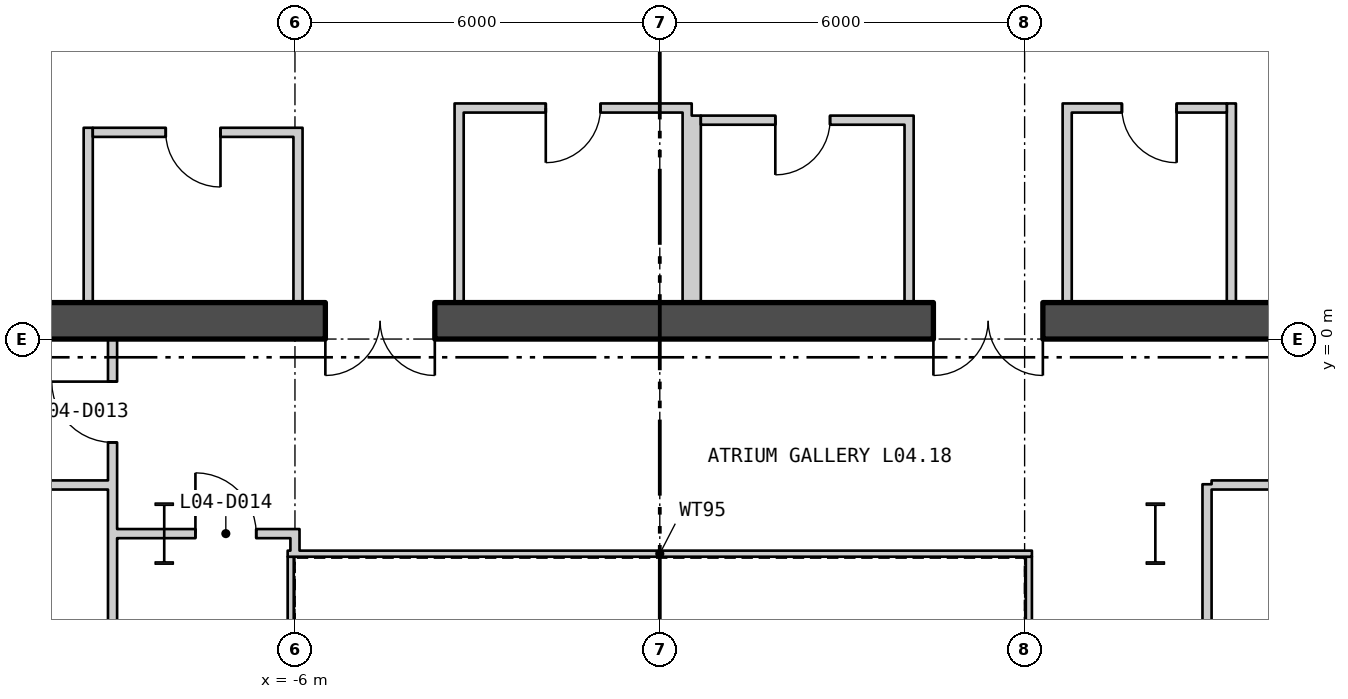
"""IFC4 building model, lengths in metres.
Left out: names, types, materials, properties, quantities, classifications, styles, units other than length and angle.
Written with IfcOpenShell. Run it as: python <this file> out.ifc"""

import sys

from ifc_helpers import new_model, si_unit, direction, frame, frame_2d, origin, origin_2d, place, context, subcontext, project, spatial, rectangle, i_section, extrude, element, fill, save


model = new_model("IFC4")
c1 = context("Model", 3, precision=1e-05, world=origin(), true_north=direction((0.0, 1.0)))
c2 = subcontext(c1, "Body", "Model", "MODEL_VIEW")
j1 = project(units=[si_unit("LENGTHUNIT", "METRE"), si_unit("PLANEANGLEUNIT", "RADIAN")], contexts=[c1])
p1 = place(None, origin())
s1 = spatial("IfcSite", under=j1, at=p1, CompositionType="ELEMENT")
p2 = place(p1, origin())
s2 = spatial("IfcBuilding", under=s1, at=p2, CompositionType="ELEMENT")
p3 = place(p2, frame((0.0, 0.0, 23.7)))
s3 = spatial("IfcBuildingStorey", under=s2, at=p3, CompositionType="ELEMENT", Elevation=23.7)
for number, where, z_axis, x_axis in (
    (1, (8.15, -3.2, 0.0), (0.0, 0.0, 1.0), (1.0, 0.0, 0.0)),
    (2, (-8.15, -3.2, 0.0), (0.0, 0.0, 1.0), (1.0, 0.0, 0.0)),
):
    element("IfcColumn", number, at=place(p3, frame(where, z_axis=z_axis, x_axis=x_axis)), inside=s3, PredefinedType="COLUMN", context=c2, shape_type="SweptSolid", body=[
        extrude(i_section(OverallWidth=0.302, OverallDepth=1.008, WebThickness=0.021, FlangeThickness=0.04, at=origin_2d()), origin(), (0.0, 0.0, 1.0), 5.1),
    ])
p4 = place(p3, frame((6.07, -11.62, 0.0), z_axis=(0.0, 0.0, 1.0), x_axis=(0.0, 1.0, 0.0)))
e3 = element("IfcWall", 3, at=p4, inside=s3, PredefinedType="PARTITIONING", context=c2, shape_type="SweptSolid", body=[
    extrude(rectangle(XDim=8.04, YDim=0.1, at=frame_2d((4.02, 0.0))), origin(), (0.0, 0.0, 1.0), 4.85),
])
p5 = place(p3, frame((6.12, -3.53, 0.0), z_axis=(0.0, 0.0, 1.0), x_axis=(-1.0, 0.0, 0.0)))
e4 = element("IfcWall", 4, at=p5, inside=s3, PredefinedType="PARTITIONING", context=c2, shape_type="SweptSolid", body=[
    extrude(rectangle(XDim=12.24, YDim=0.1, at=frame_2d((6.12, 0.0))), origin(), (0.0, 0.0, 1.0), 4.85),
])
p6 = place(p3, frame((-6.07, -3.58, 0.0), z_axis=(0.0, 0.0, 1.0), x_axis=(0.0, -1.0, 0.0)))
e5 = element("IfcWall", 5, at=p6, inside=s3, PredefinedType="PARTITIONING", context=c2, shape_type="SweptSolid", body=[
    extrude(rectangle(XDim=8.04, YDim=0.1, at=frame_2d((4.02, 0.0))), origin(), (0.0, 0.0, 1.0), 4.85),
])
p7 = place(p3, frame((-17.5, 0.3, 0.0), z_axis=(0.0, 0.0, 1.0), x_axis=(1.0, 0.0, 0.0)))
e6 = element("IfcWall", 6, at=p7, inside=s3, PredefinedType="SHEAR", context=c2, shape_type="SweptSolid", body=[
    extrude(rectangle(XDim=35.0, YDim=0.6, at=frame_2d((17.5, 0.0))), origin(), (0.0, 0.0, 1.0), 4.85),
])
p8 = place(p7, frame((12.0, 0.0, 0.0)))
e7 = element("IfcOpeningElement", 7, at=p8, cuts=e6, PredefinedType="OPENING", context=c2, shape_type="SweptSolid", body=[
    extrude(rectangle(XDim=1.8, YDim=2.4, at=frame_2d((0.9, 1.2))), frame((0.0, 0.31, 0.0), z_axis=(0.0, -1.0, 0.0), x_axis=(1.0, 0.0, 0.0)), (0.0, 0.0, 1.0), 0.62),
])
p9 = place(p7, frame((22.0, 0.0, 0.0)))
e8 = element("IfcOpeningElement", 8, at=p9, cuts=e6, PredefinedType="OPENING", context=c2, shape_type="SweptSolid", body=[
    extrude(rectangle(XDim=1.8, YDim=2.4, at=frame_2d((0.9, 1.2))), frame((0.0, 0.31, 0.0), z_axis=(0.0, -1.0, 0.0), x_axis=(1.0, 0.0, 0.0)), (0.0, 0.0, 1.0), 0.62),
])
for number, where, z_axis, x_axis in (
    (9, (-9.4, 0.6, 0.0), (0.0, 0.0, 1.0), (0.0, 1.0, 0.0)),
    (10, (-5.95, 0.6, 0.0), (0.0, 0.0, 1.0), (0.0, 1.0, 0.0)),
):
    element("IfcWall", number, at=place(p3, frame(where, z_axis=z_axis, x_axis=x_axis)), inside=s3, PredefinedType="PARTITIONING", context=c2, shape_type="SweptSolid", body=[
        extrude(rectangle(XDim=2.875, YDim=0.15, at=frame_2d((1.438, 0.0))), origin(), (0.0, 0.0, 1.0), 4.85),
    ])
p10 = place(p3, frame((-9.325, 3.4, 0.0), z_axis=(0.0, 0.0, 1.0), x_axis=(1.0, 0.0, 0.0)))
e11 = element("IfcWall", 11, at=p10, inside=s3, PredefinedType="PARTITIONING", context=c2, shape_type="SweptSolid", body=[
    extrude(rectangle(XDim=3.3, YDim=0.15, at=frame_2d((1.65, 0.0))), origin(), (0.0, 0.0, 1.0), 4.85),
])
p11 = place(p10, frame((1.2, 0.0, 0.0)))
e12 = element("IfcOpeningElement", 12, at=p11, cuts=e11, PredefinedType="OPENING", context=c2, shape_type="SweptSolid", body=[
    extrude(rectangle(XDim=0.9, YDim=2.1, at=frame_2d((0.45, 1.05))), frame((0.0, 0.085, 0.0), z_axis=(0.0, -1.0, 0.0), x_axis=(1.0, 0.0, 0.0)), (0.0, 0.0, 1.0), 0.17),
])
for number, where, z_axis, x_axis in (
    (13, (-3.3, 0.6, 0.0), (0.0, 0.0, 1.0), (0.0, 1.0, 0.0)),
    (14, (0.45, 0.6, 0.0), (0.0, 0.0, 1.0), (0.0, 1.0, 0.0)),
):
    element("IfcWall", number, at=place(p3, frame(where, z_axis=z_axis, x_axis=x_axis)), inside=s3, PredefinedType="PARTITIONING", context=c2, shape_type="SweptSolid", body=[
        extrude(rectangle(XDim=3.275, YDim=0.15, at=frame_2d((1.637, 0.0))), origin(), (0.0, 0.0, 1.0), 4.85),
    ])
p12 = place(p3, frame((-3.225, 3.8, 0.0), z_axis=(0.0, 0.0, 1.0), x_axis=(1.0, 0.0, 0.0)))
e15 = element("IfcWall", 15, at=p12, inside=s3, PredefinedType="PARTITIONING", context=c2, shape_type="SweptSolid", body=[
    extrude(rectangle(XDim=3.6, YDim=0.15, at=frame_2d((1.8, 0.0))), origin(), (0.0, 0.0, 1.0), 4.85),
])
p13 = place(p12, frame((1.35, 0.0, 0.0)))
e16 = element("IfcOpeningElement", 16, at=p13, cuts=e15, PredefinedType="OPENING", context=c2, shape_type="SweptSolid", body=[
    extrude(rectangle(XDim=0.9, YDim=2.1, at=frame_2d((0.45, 1.05))), frame((0.0, 0.085, 0.0), z_axis=(0.0, -1.0, 0.0), x_axis=(1.0, 0.0, 0.0)), (0.0, 0.0, 1.0), 0.17),
])
for number, where, z_axis, x_axis in (
    (17, (0.6, 0.6, 0.0), (0.0, 0.0, 1.0), (0.0, 1.0, 0.0)),
    (18, (4.1, 0.6, 0.0), (0.0, 0.0, 1.0), (0.0, 1.0, 0.0)),
):
    element("IfcWall", number, at=place(p3, frame(where, z_axis=z_axis, x_axis=x_axis)), inside=s3, PredefinedType="PARTITIONING", context=c2, shape_type="SweptSolid", body=[
        extrude(rectangle(XDim=3.075, YDim=0.15, at=frame_2d((1.538, 0.0))), origin(), (0.0, 0.0, 1.0), 4.85),
    ])
p14 = place(p3, frame((0.675, 3.6, 0.0), z_axis=(0.0, 0.0, 1.0), x_axis=(1.0, 0.0, 0.0)))
e19 = element("IfcWall", 19, at=p14, inside=s3, PredefinedType="PARTITIONING", context=c2, shape_type="SweptSolid", body=[
    extrude(rectangle(XDim=3.35, YDim=0.15, at=frame_2d((1.675, 0.0))), origin(), (0.0, 0.0, 1.0), 4.85),
])
p15 = place(p14, frame((1.225, 0.0, 0.0)))
e20 = element("IfcOpeningElement", 20, at=p15, cuts=e19, PredefinedType="OPENING", context=c2, shape_type="SweptSolid", body=[
    extrude(rectangle(XDim=0.9, YDim=2.1, at=frame_2d((0.45, 1.05))), frame((0.0, 0.085, 0.0), z_axis=(0.0, -1.0, 0.0), x_axis=(1.0, 0.0, 0.0)), (0.0, 0.0, 1.0), 0.17),
])
for number, where, z_axis, x_axis in (
    (21, (6.7, 0.6, 0.0), (0.0, 0.0, 1.0), (0.0, 1.0, 0.0)),
    (22, (9.4, 0.6, 0.0), (0.0, 0.0, 1.0), (0.0, 1.0, 0.0)),
):
    element("IfcWall", number, at=place(p3, frame(where, z_axis=z_axis, x_axis=x_axis)), inside=s3, PredefinedType="PARTITIONING", context=c2, shape_type="SweptSolid", body=[
        extrude(rectangle(XDim=3.275, YDim=0.15, at=frame_2d((1.637, 0.0))), origin(), (0.0, 0.0, 1.0), 4.85),
    ])
p16 = place(p3, frame((6.775, 3.8, 0.0), z_axis=(0.0, 0.0, 1.0), x_axis=(1.0, 0.0, 0.0)))
e23 = element("IfcWall", 23, at=p16, inside=s3, PredefinedType="PARTITIONING", context=c2, shape_type="SweptSolid", body=[
    extrude(rectangle(XDim=2.55, YDim=0.15, at=frame_2d((1.275, 0.0))), origin(), (0.0, 0.0, 1.0), 4.85),
])
p17 = place(p16, frame((0.825, 0.0, 0.0)))
e24 = element("IfcOpeningElement", 24, at=p17, cuts=e23, PredefinedType="OPENING", context=c2, shape_type="SweptSolid", body=[
    extrude(rectangle(XDim=0.9, YDim=2.1, at=frame_2d((0.45, 1.05))), frame((0.0, 0.085, 0.0), z_axis=(0.0, -1.0, 0.0), x_axis=(1.0, 0.0, 0.0)), (0.0, 0.0, 1.0), 0.17),
])
p18 = place(p3, frame((-17.025, -2.4, 0.0), z_axis=(0.0, 0.0, 1.0), x_axis=(1.0, 0.0, 0.0)))
e25 = element("IfcWall", 25, at=p18, inside=s3, PredefinedType="PARTITIONING", context=c2, shape_type="SweptSolid", body=[
    extrude(rectangle(XDim=7.95, YDim=0.15, at=frame_2d((3.975, 0.0))), origin(), (0.0, 0.0, 1.0), 4.85),
])
p19 = place(p18, frame((5.294, 0.0, 0.0)))
e26 = element("IfcOpeningElement", 26, at=p19, cuts=e25, PredefinedType="OPENING", context=c2, shape_type="SweptSolid", body=[
    extrude(rectangle(XDim=1.0, YDim=2.1, at=frame_2d((0.5, 1.05))), frame((0.0, 0.085, 0.0), z_axis=(0.0, -1.0, 0.0), x_axis=(1.0, 0.0, 0.0)), (0.0, 0.0, 1.0), 0.17),
])
p20 = place(p3, frame((-9.0, -13.675, 0.0), z_axis=(0.0, 0.0, 1.0), x_axis=(0.0, 1.0, 0.0)))
e27 = element("IfcWall", 27, at=p20, inside=s3, PredefinedType="PARTITIONING", context=c2, shape_type="SweptSolid", body=[
    extrude(rectangle(XDim=13.675, YDim=0.15, at=frame_2d((6.838, 0.0))), origin(), (0.0, 0.0, 1.0), 4.85),
])
p21 = place(p20, frame((11.975, 0.0, 0.0)))
e28 = element("IfcOpeningElement", 28, at=p21, cuts=e27, PredefinedType="OPENING", context=c2, shape_type="SweptSolid", body=[
    extrude(rectangle(XDim=1.0, YDim=2.1, at=frame_2d((0.5, 1.05))), frame((0.0, 0.085, 0.0), z_axis=(0.0, -1.0, 0.0), x_axis=(1.0, 0.0, 0.0)), (0.0, 0.0, 1.0), 0.17),
])
p22 = place(p3, frame((-8.925, -3.2, 0.0), z_axis=(0.0, 0.0, 1.0), x_axis=(1.0, 0.0, 0.0)))
e29 = element("IfcWall", 29, at=p22, inside=s3, PredefinedType="PARTITIONING", context=c2, shape_type="SweptSolid", body=[
    extrude(rectangle(XDim=0.775, YDim=0.15, at=frame_2d((0.388, 0.0))), origin(), (0.0, 0.0, 1.0), 4.16),
])
p23 = place(p3, frame((-8.15, -3.2, 0.0), z_axis=(0.0, 0.0, 1.0), x_axis=(1.0, 0.0, 0.0)))
e30 = element("IfcWall", 30, at=p23, inside=s3, PredefinedType="PARTITIONING", context=c2, shape_type="SweptSolid", body=[
    extrude(rectangle(XDim=2.225, YDim=0.15, at=frame_2d((1.113, 0.0))), origin(), (0.0, 0.0, 1.0), 3.94),
])
p24 = place(p23, frame((0.513, 0.0, 0.0)))
e31 = element("IfcOpeningElement", 31, at=p24, cuts=e30, PredefinedType="OPENING", context=c2, shape_type="SweptSolid", body=[
    extrude(rectangle(XDim=1.0, YDim=2.1, at=frame_2d((0.5, 1.05))), frame((0.0, 0.085, 0.0), z_axis=(0.0, -1.0, 0.0), x_axis=(1.0, 0.0, 0.0)), (0.0, 0.0, 1.0), 0.17),
])
p25 = place(p3, frame((-6.0, -3.48, 0.0), z_axis=(0.0, 0.0, 1.0), x_axis=(0.0, 1.0, 0.0)))
e32 = element("IfcWall", 32, at=p25, inside=s3, PredefinedType="PARTITIONING", context=c2, shape_type="SweptSolid", body=[
    extrude(rectangle(XDim=0.205, YDim=0.15, at=frame_2d((0.102, 0.0))), origin(), (0.0, 0.0, 1.0), 4.85),
])
p26 = place(p3, frame((9.0, -13.675, 0.0), z_axis=(0.0, 0.0, 1.0), x_axis=(0.0, 1.0, 0.0)))
e33 = element("IfcWall", 33, at=p26, inside=s3, PredefinedType="PARTITIONING", context=c2, shape_type="SweptSolid", body=[
    extrude(rectangle(XDim=11.287, YDim=0.15, at=frame_2d((5.644, 0.0))), origin(), (0.0, 0.0, 1.0), 4.85),
])
p27 = place(p26, frame((2.498, 0.0, 0.0)))
e34 = element("IfcOpeningElement", 34, at=p27, cuts=e33, PredefinedType="OPENING", context=c2, shape_type="SweptSolid", body=[
    extrude(rectangle(XDim=1.8, YDim=2.1, at=frame_2d((0.9, 1.05))), frame((0.0, 0.085, 0.0), z_axis=(0.0, -1.0, 0.0), x_axis=(1.0, 0.0, 0.0)), (0.0, 0.0, 1.0), 0.17),
])
p28 = place(p3, frame((9.075, -2.4, 0.0), z_axis=(0.0, 0.0, 1.0), x_axis=(1.0, 0.0, 0.0)))
e35 = element("IfcWall", 35, at=p28, inside=s3, PredefinedType="PARTITIONING", context=c2, shape_type="SweptSolid", body=[
    extrude(rectangle(XDim=7.95, YDim=0.15, at=frame_2d((3.975, 0.0))), origin(), (0.0, 0.0, 1.0), 4.85),
])
p29 = place(p28, frame((1.329, 0.0, 0.0)))
e36 = element("IfcOpeningElement", 36, at=p29, cuts=e35, PredefinedType="OPENING", context=c2, shape_type="SweptSolid", body=[
    extrude(rectangle(XDim=1.0, YDim=2.1, at=frame_2d((0.5, 1.05))), frame((0.0, 0.085, 0.0), z_axis=(0.0, -1.0, 0.0), x_axis=(1.0, 0.0, 0.0)), (0.0, 0.0, 1.0), 0.17),
])
p30 = place(p28, frame((5.279, 0.0, 0.0)))
e37 = element("IfcOpeningElement", 37, at=p30, cuts=e35, PredefinedType="OPENING", context=c2, shape_type="SweptSolid", body=[
    extrude(rectangle(XDim=1.0, YDim=2.1, at=frame_2d((0.5, 1.05))), frame((0.0, 0.085, 0.0), z_axis=(0.0, -1.0, 0.0), x_axis=(1.0, 0.0, 0.0)), (0.0, 0.0, 1.0), 0.17),
])
p31 = place(p11, origin())
e38 = element("IfcDoor", 38, at=p31, inside=s3, OperationType="SINGLE_SWING_RIGHT", PredefinedType="DOOR", context=c2, shape_type="SweptSolid", body=[
    extrude(rectangle(XDim=0.9, YDim=2.1, at=frame_2d((0.45, 1.05))), frame((0.0, 0.025, 0.0), z_axis=(0.0, -1.0, 0.0), x_axis=(1.0, 0.0, 0.0)), (0.0, 0.0, 1.0), 0.05),
])
fill(e12, e38)
p32 = place(p13, origin())
e39 = element("IfcDoor", 39, at=p32, inside=s3, OperationType="SINGLE_SWING_LEFT", PredefinedType="DOOR", context=c2, shape_type="SweptSolid", body=[
    extrude(rectangle(XDim=0.9, YDim=2.1, at=frame_2d((0.45, 1.05))), frame((0.0, 0.025, 0.0), z_axis=(0.0, -1.0, 0.0), x_axis=(1.0, 0.0, 0.0)), (0.0, 0.0, 1.0), 0.05),
])
fill(e16, e39)
p33 = place(p15, origin())
e40 = element("IfcDoor", 40, at=p33, inside=s3, OperationType="SINGLE_SWING_LEFT", PredefinedType="DOOR", context=c2, shape_type="SweptSolid", body=[
    extrude(rectangle(XDim=0.9, YDim=2.1, at=frame_2d((0.45, 1.05))), frame((0.0, 0.025, 0.0), z_axis=(0.0, -1.0, 0.0), x_axis=(1.0, 0.0, 0.0)), (0.0, 0.0, 1.0), 0.05),
])
fill(e20, e40)
p34 = place(p17, origin())
e41 = element("IfcDoor", 41, at=p34, inside=s3, OperationType="SINGLE_SWING_RIGHT", PredefinedType="DOOR", context=c2, shape_type="SweptSolid", body=[
    extrude(rectangle(XDim=0.9, YDim=2.1, at=frame_2d((0.45, 1.05))), frame((0.0, 0.025, 0.0), z_axis=(0.0, -1.0, 0.0), x_axis=(1.0, 0.0, 0.0)), (0.0, 0.0, 1.0), 0.05),
])
fill(e24, e41)
p35 = place(p8, origin())
e42 = element("IfcDoor", 42, at=p35, inside=s3, OperationType="DOUBLE_DOOR_SINGLE_SWING", PredefinedType="DOOR", context=c2, shape_type="SweptSolid", body=[
    extrude(rectangle(XDim=1.8, YDim=2.4, at=frame_2d((0.9, 1.2))), frame((0.0, 0.025, 0.0), z_axis=(0.0, -1.0, 0.0), x_axis=(1.0, 0.0, 0.0)), (0.0, 0.0, 1.0), 0.05),
])
fill(e7, e42)
p36 = place(p9, origin())
e43 = element("IfcDoor", 43, at=p36, inside=s3, OperationType="DOUBLE_DOOR_SINGLE_SWING", PredefinedType="DOOR", context=c2, shape_type="SweptSolid", body=[
    extrude(rectangle(XDim=1.8, YDim=2.4, at=frame_2d((0.9, 1.2))), frame((0.0, 0.025, 0.0), z_axis=(0.0, -1.0, 0.0), x_axis=(1.0, 0.0, 0.0)), (0.0, 0.0, 1.0), 0.05),
])
fill(e8, e43)
p37 = place(p21, origin())
e44 = element("IfcDoor", 44, at=p37, inside=s3, OperationType="SINGLE_SWING_LEFT", PredefinedType="DOOR", context=c2, shape_type="SweptSolid", body=[
    extrude(rectangle(XDim=1.0, YDim=2.1, at=frame_2d((0.5, 1.05))), frame((0.0, 0.025, 0.0), z_axis=(0.0, -1.0, 0.0), x_axis=(1.0, 0.0, 0.0)), (0.0, 0.0, 1.0), 0.05),
])
fill(e28, e44)
p38 = place(p24, origin())
e45 = element("IfcDoor", 45, at=p38, inside=s3, OperationType="SINGLE_SWING_RIGHT", PredefinedType="DOOR", context=c2, shape_type="SweptSolid", body=[
    extrude(rectangle(XDim=1.0, YDim=2.1, at=frame_2d((0.5, 1.05))), frame((0.0, 0.025, 0.0), z_axis=(0.0, -1.0, 0.0), x_axis=(1.0, 0.0, 0.0)), (0.0, 0.0, 1.0), 0.05),
])
fill(e31, e45)
save(model, sys.argv[1])
